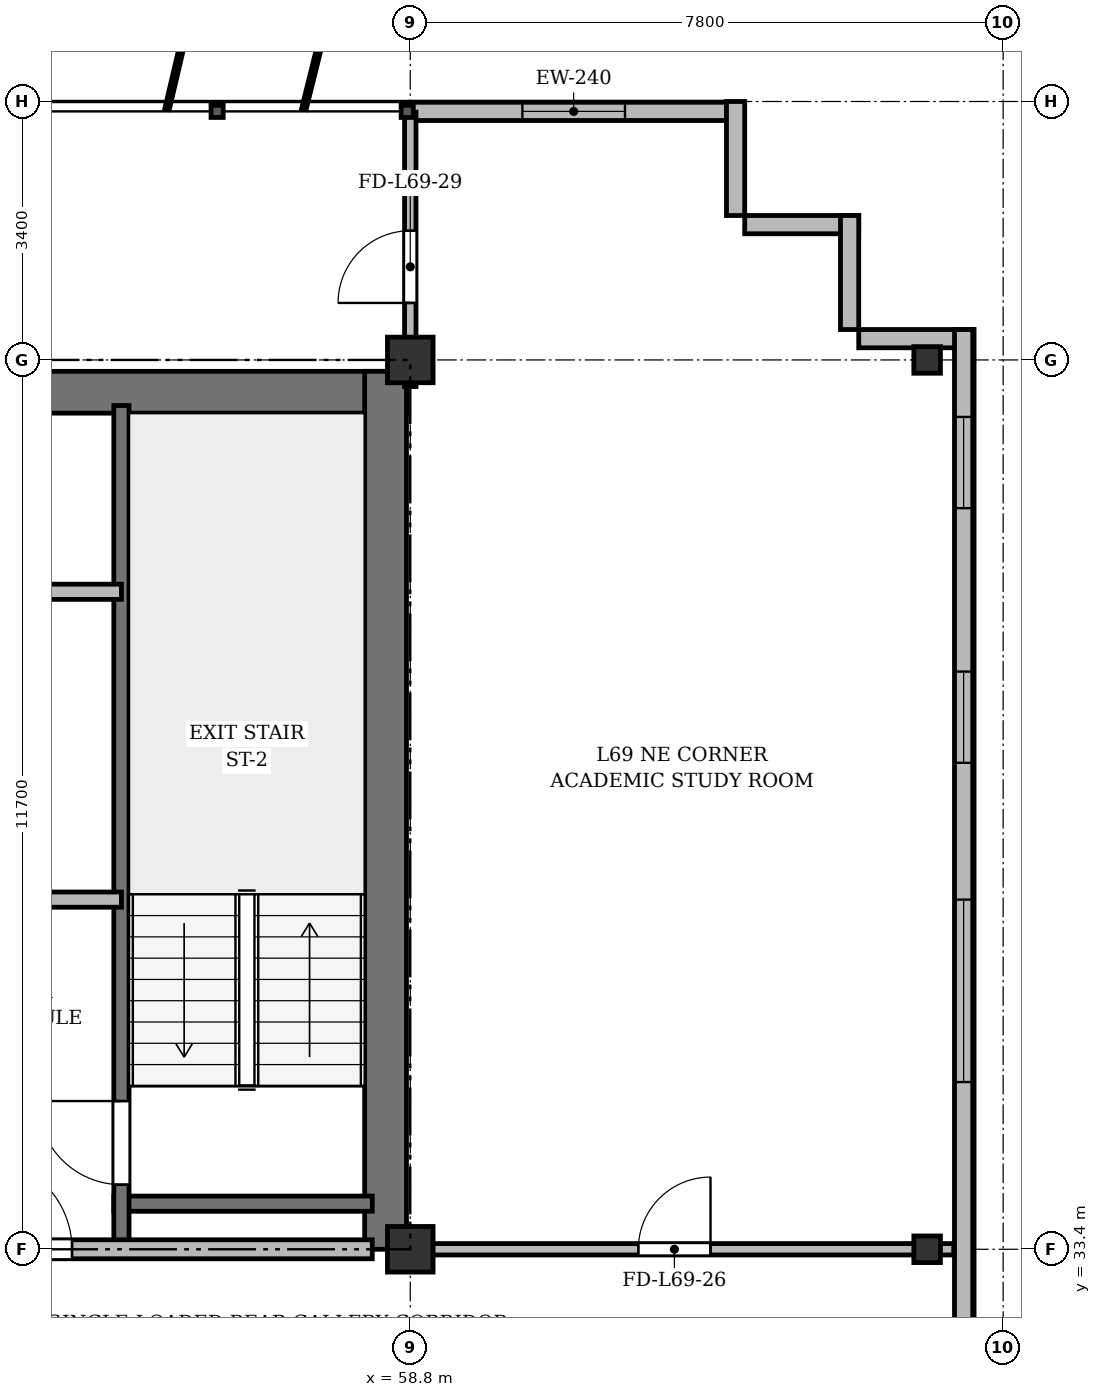
"""IFC4 building model, lengths in metres.
Left out: names, types, materials, properties, quantities, classifications, styles, units other than length and angle.
Written with IfcOpenShell. Run it as: python <this file> out.ifc"""

import sys

from ifc_helpers import new_model, si_unit, direction, frame, frame_2d, origin, origin_2d, place, context, subcontext, project, spatial, rectangle, i_section, extrude, source, transform, mapped, element, fill, save


model = new_model("IFC4")
c1 = context("Model", 3, precision=1e-05, world=origin(), true_north=direction((0.0, 1.0)))
c2 = subcontext(c1, "Body", "Model", "MODEL_VIEW")
j1 = project(units=[si_unit("LENGTHUNIT", "METRE"), si_unit("PLANEANGLEUNIT", "RADIAN")], contexts=[c1])
p1 = place(None, origin())
s1 = spatial("IfcSite", under=j1, at=p1, CompositionType="ELEMENT")
p2 = place(p1, origin())
s2 = spatial("IfcBuilding", under=s1, at=p2, CompositionType="ELEMENT")
p3 = place(p2, frame((0.0, 0.0, 266.7)))
s3 = spatial("IfcBuildingStorey", under=s2, at=p3, CompositionType="ELEMENT", Elevation=266.7)
m1 = source(origin(), c2, "Body", "SweptSolid", [
    extrude(rectangle(XDim=0.6, YDim=0.6, at=origin_2d()), origin(), (0.0, 0.0, 1.0), 3.6),
])
for number, where, z_axis, x_axis in (
    (1, (58.8, 33.4, 0.0), (0.0, 0.0, 1.0), (1.0, 0.0, 0.0)),
    (2, (58.8, 45.1, 0.0), (0.0, 0.0, 1.0), (1.0, 0.0, 0.0)),
):
    element("IfcColumn", number, at=place(p3, frame(where, z_axis=z_axis, x_axis=x_axis)), inside=s3, PredefinedType="COLUMN", context=c2, shape_type="MappedRepresentation", body=[
        mapped(m1, transform((0.0, 0.0, 0.0), x_axis=(1.0, 0.0, 0.0), y_axis=(0.0, 1.0, 0.0), z_axis=(0.0, 0.0, 1.0), scale=1.0)),
    ])
m2 = source(origin(), c2, "Body", "SweptSolid", [
    extrude(i_section(OverallWidth=0.35, OverallDepth=0.35, WebThickness=0.018, FlangeThickness=0.028, at=origin_2d()), origin(), (0.0, 0.0, 1.0), 3.6),
])
for number, where, z_axis, x_axis in (
    (3, (65.6, 33.4, 0.0), (0.0, 0.0, 1.0), (1.0, 0.0, 0.0)),
    (4, (65.6, 45.1, 0.0), (0.0, 0.0, 1.0), (1.0, 0.0, 0.0)),
):
    element("IfcColumn", number, at=place(p3, frame(where, z_axis=z_axis, x_axis=x_axis)), inside=s3, PredefinedType="COLUMN", context=c2, shape_type="MappedRepresentation", body=[
        mapped(m2, transform((0.0, 0.0, 0.0), x_axis=(1.0, 0.0, 0.0), y_axis=(0.0, 1.0, 0.0), z_axis=(0.0, 0.0, 1.0), scale=1.0)),
    ])
p4 = place(p3, frame((58.8, 48.37, 0.0), z_axis=(0.0, 0.0, 1.0), x_axis=(1.0, 0.0, 0.0)))
e5 = element("IfcWall", 5, at=p4, inside=s3, PredefinedType="SOLIDWALL", context=c2, shape_type="SweptSolid", body=[
    extrude(rectangle(XDim=4.3, YDim=0.24, at=frame_2d((2.15, 0.0))), origin(), (0.0, 0.0, 1.0), 3.37),
])
p5 = place(p4, frame((1.475, 0.0, 0.9)))
e6 = element("IfcOpeningElement", 6, at=p5, cuts=e5, PredefinedType="OPENING", context=c2, shape_type="SweptSolid", body=[
    extrude(rectangle(XDim=1.35, YDim=1.5, at=frame_2d((0.675, 0.75))), frame((0.0, 0.13, 0.0), z_axis=(0.0, -1.0, 0.0), x_axis=(1.0, 0.0, 0.0)), (0.0, 0.0, 1.0), 0.26),
])
for number, where, z_axis, x_axis in (
    (7, (63.08, 48.5, 0.0), (0.0, 0.0, 1.0), (0.0, -1.0, 0.0)),
    (8, (63.2, 46.88, 0.0), (0.0, 0.0, 1.0), (1.0, 0.0, 0.0)),
    (9, (64.58, 47.0, 0.0), (0.0, 0.0, 1.0), (0.0, -1.0, 0.0)),
    (10, (64.7, 45.38, 0.0), (0.0, 0.0, 1.0), (1.0, 0.0, 0.0)),
):
    element("IfcWall", number, at=place(p3, frame(where, z_axis=z_axis, x_axis=x_axis)), inside=s3, PredefinedType="SOLIDWALL", context=c2, shape_type="SweptSolid", body=[
        extrude(rectangle(XDim=1.5, YDim=0.24, at=frame_2d((0.75, 0.0))), origin(), (0.0, 0.0, 1.0), 3.37),
    ])
p6 = place(p3, frame((66.08, 45.5, 0.0), z_axis=(0.0, 0.0, 1.0), x_axis=(0.0, -1.0, 0.0)))
e11 = element("IfcWall", 11, at=p6, inside=s3, PredefinedType="SOLIDWALL", context=c2, shape_type="SweptSolid", body=[
    extrude(rectangle(XDim=39.0, YDim=0.24, at=frame_2d((19.5, 0.0))), origin(), (0.0, 0.0, 1.0), 3.37),
])
p7 = place(p6, frame((36.35, 0.0, 0.92)))
e12 = element("IfcOpeningElement", 12, at=p7, cuts=e11, PredefinedType="OPENING", context=c2, shape_type="SweptSolid", body=[
    extrude(rectangle(XDim=1.2, YDim=1.65, at=frame_2d((0.6, 0.825))), frame((0.0, 0.13, 0.0), z_axis=(0.0, -1.0, 0.0), x_axis=(1.0, 0.0, 0.0)), (0.0, 0.0, 1.0), 0.26),
])
p8 = place(p6, frame((32.9, 0.0, 0.92)))
e13 = element("IfcOpeningElement", 13, at=p8, cuts=e11, PredefinedType="OPENING", context=c2, shape_type="SweptSolid", body=[
    extrude(rectangle(XDim=2.4, YDim=2.1, at=frame_2d((1.2, 1.05))), frame((0.0, 0.13, 0.0), z_axis=(0.0, -1.0, 0.0), x_axis=(1.0, 0.0, 0.0)), (0.0, 0.0, 1.0), 0.26),
])
p9 = place(p6, frame((28.7, 0.0, 0.92)))
e14 = element("IfcOpeningElement", 14, at=p9, cuts=e11, PredefinedType="OPENING", context=c2, shape_type="SweptSolid", body=[
    extrude(rectangle(XDim=2.4, YDim=2.1, at=frame_2d((1.2, 1.05))), frame((0.0, 0.13, 0.0), z_axis=(0.0, -1.0, 0.0), x_axis=(1.0, 0.0, 0.0)), (0.0, 0.0, 1.0), 0.26),
])
p10 = place(p6, frame((21.5, 0.0, 0.92)))
e15 = element("IfcOpeningElement", 15, at=p10, cuts=e11, PredefinedType="OPENING", context=c2, shape_type="SweptSolid", body=[
    extrude(rectangle(XDim=2.4, YDim=2.1, at=frame_2d((1.2, 1.05))), frame((0.0, 0.13, 0.0), z_axis=(0.0, -1.0, 0.0), x_axis=(1.0, 0.0, 0.0)), (0.0, 0.0, 1.0), 0.26),
])
p11 = place(p6, frame((7.5, 0.0, 0.92)))
e16 = element("IfcOpeningElement", 16, at=p11, cuts=e11, PredefinedType="OPENING", context=c2, shape_type="SweptSolid", body=[
    extrude(rectangle(XDim=2.4, YDim=2.1, at=frame_2d((1.2, 1.05))), frame((0.0, 0.13, 0.0), z_axis=(0.0, -1.0, 0.0), x_axis=(1.0, 0.0, 0.0)), (0.0, 0.0, 1.0), 0.26),
])
p12 = place(p6, frame((4.5, 0.0, 0.92)))
e17 = element("IfcOpeningElement", 17, at=p12, cuts=e11, PredefinedType="OPENING", context=c2, shape_type="SweptSolid", body=[
    extrude(rectangle(XDim=1.2, YDim=1.65, at=frame_2d((0.6, 0.825))), frame((0.0, 0.13, 0.0), z_axis=(0.0, -1.0, 0.0), x_axis=(1.0, 0.0, 0.0)), (0.0, 0.0, 1.0), 0.26),
])
p13 = place(p6, frame((1.15, 0.0, 0.92)))
e18 = element("IfcOpeningElement", 18, at=p13, cuts=e11, PredefinedType="OPENING", context=c2, shape_type="SweptSolid", body=[
    extrude(rectangle(XDim=1.2, YDim=1.65, at=frame_2d((0.6, 0.825))), frame((0.0, 0.13, 0.0), z_axis=(0.0, -1.0, 0.0), x_axis=(1.0, 0.0, 0.0)), (0.0, 0.0, 1.0), 0.26),
])
p14 = place(p3, frame((15.65, 44.675, 0.0), z_axis=(0.0, 0.0, 1.0), x_axis=(1.0, 0.0, 0.0)))
e19 = element("IfcWall", 19, at=p14, inside=s3, PredefinedType="SHEAR", context=c2, shape_type="SweptSolid", body=[
    extrude(rectangle(XDim=43.1, YDim=0.55, at=frame_2d((21.55, 0.0))), origin(), (0.0, 0.0, 1.0), 3.37),
])
p15 = place(p3, frame((58.475, 33.4, 0.0), z_axis=(0.0, 0.0, 1.0), x_axis=(0.0, 1.0, 0.0)))
e20 = element("IfcWall", 20, at=p15, inside=s3, PredefinedType="SHEAR", context=c2, shape_type="SweptSolid", body=[
    extrude(rectangle(XDim=11.55, YDim=0.55, at=frame_2d((5.775, 0.0))), origin(), (0.0, 0.0, 1.0), 3.37),
])
p16 = place(p3, frame((54.9, 34.0, 0.0), z_axis=(0.0, 0.0, 1.0), x_axis=(1.0, 0.0, 0.0)))
e21 = element("IfcWall", 21, at=p16, inside=s3, PredefinedType="SHEAR", context=c2, shape_type="SweptSolid", body=[
    extrude(rectangle(XDim=3.4, YDim=0.2, at=frame_2d((1.7, 0.0))), origin(), (0.0, 0.0, 1.0), 3.37),
])
p17 = place(p3, frame((55.0, 33.4, 0.0), z_axis=(0.0, 0.0, 1.0), x_axis=(0.0, 1.0, 0.0)))
e22 = element("IfcWall", 22, at=p17, inside=s3, PredefinedType="SHEAR", context=c2, shape_type="SweptSolid", body=[
    extrude(rectangle(XDim=11.1, YDim=0.2, at=frame_2d((5.55, 0.0))), origin(), (0.0, 0.0, 1.0), 3.37),
])
p18 = place(p17, frame((0.85, 0.0, 0.0)))
e23 = element("IfcOpeningElement", 23, at=p18, cuts=e22, PredefinedType="OPENING", context=c2, shape_type="SweptSolid", body=[
    extrude(rectangle(XDim=1.1, YDim=2.15, at=frame_2d((0.55, 1.075))), frame((0.0, 0.11, 0.0), z_axis=(0.0, -1.0, 0.0), x_axis=(1.0, 0.0, 0.0)), (0.0, 0.0, 1.0), 0.22),
])
p19 = place(p3, frame((47.15, 42.05, 0.0), z_axis=(0.0, 0.0, 1.0), x_axis=(1.0, 0.0, 0.0)))
e24 = element("IfcWall", 24, at=p19, inside=s3, PredefinedType="SOLIDWALL", context=c2, shape_type="SweptSolid", body=[
    extrude(rectangle(XDim=7.85, YDim=0.2, at=frame_2d((3.925, 0.0))), origin(), (0.0, 0.0, 1.0), 2.87),
])
p20 = place(p19, frame((0.75, 0.0, 0.0)))
e25 = element("IfcOpeningElement", 25, at=p20, cuts=e24, PredefinedType="OPENING", context=c2, shape_type="SweptSolid", body=[
    extrude(rectangle(XDim=0.9, YDim=2.1, at=frame_2d((0.45, 1.05))), frame((0.0, 0.11, 0.0), z_axis=(0.0, -1.0, 0.0), x_axis=(1.0, 0.0, 0.0)), (0.0, 0.0, 1.0), 0.22),
])
p21 = place(p19, frame((3.85, 0.0, 0.0)))
e26 = element("IfcOpeningElement", 26, at=p21, cuts=e24, PredefinedType="OPENING", context=c2, shape_type="SweptSolid", body=[
    extrude(rectangle(XDim=0.9, YDim=2.1, at=frame_2d((0.45, 1.05))), frame((0.0, 0.11, 0.0), z_axis=(0.0, -1.0, 0.0), x_axis=(1.0, 0.0, 0.0)), (0.0, 0.0, 1.0), 0.22),
])
p22 = place(p3, frame((52.45, 38.0, 0.0), z_axis=(0.0, 0.0, 1.0), x_axis=(1.0, 0.0, 0.0)))
e27 = element("IfcWall", 27, at=p22, inside=s3, PredefinedType="PARTITIONING", context=c2, shape_type="SweptSolid", body=[
    extrude(rectangle(XDim=2.55, YDim=0.2, at=frame_2d((1.275, 0.0))), origin(), (0.0, 0.0, 1.0), 3.37),
])
p23 = place(p3, frame((47.15, 33.4, 0.0), z_axis=(0.0, 0.0, 1.0), x_axis=(1.0, 0.0, 0.0)))
e28 = element("IfcWall", 28, at=p23, inside=s3, PredefinedType="PARTITIONING", context=c2, shape_type="SweptSolid", body=[
    extrude(rectangle(XDim=11.15, YDim=0.25, at=frame_2d((5.575, 0.0))), origin(), (0.0, 0.0, 1.0), 2.92),
])
p24 = place(p23, frame((0.7, 0.0, 0.0)))
e29 = element("IfcOpeningElement", 29, at=p24, cuts=e28, PredefinedType="OPENING", context=c2, shape_type="SweptSolid", body=[
    extrude(rectangle(XDim=0.95, YDim=2.15, at=frame_2d((0.475, 1.075))), frame((0.0, 0.135, 0.0), z_axis=(0.0, -1.0, 0.0), x_axis=(1.0, 0.0, 0.0)), (0.0, 0.0, 1.0), 0.27),
])
p25 = place(p23, frame((6.0, 0.0, 0.0)))
e30 = element("IfcOpeningElement", 30, at=p25, cuts=e28, PredefinedType="OPENING", context=c2, shape_type="SweptSolid", body=[
    extrude(rectangle(XDim=1.2, YDim=2.15, at=frame_2d((0.6, 1.075))), frame((0.0, 0.135, 0.0), z_axis=(0.0, -1.0, 0.0), x_axis=(1.0, 0.0, 0.0)), (0.0, 0.0, 1.0), 0.27),
])
p26 = place(p3, frame((58.8, 33.4, 0.0), z_axis=(0.0, 0.0, 1.0), x_axis=(1.0, 0.0, 0.0)))
e31 = element("IfcWall", 31, at=p26, inside=s3, PredefinedType="PARTITIONING", context=c2, shape_type="SweptSolid", body=[
    extrude(rectangle(XDim=7.15, YDim=0.15, at=frame_2d((3.575, 0.0))), origin(), (0.0, 0.0, 1.0), 2.92),
])
p27 = place(p26, frame((3.0, 0.0, 0.0)))
e32 = element("IfcOpeningElement", 32, at=p27, cuts=e31, PredefinedType="OPENING", context=c2, shape_type="SweptSolid", body=[
    extrude(rectangle(XDim=0.95, YDim=2.15, at=frame_2d((0.475, 1.075))), frame((0.0, 0.085, 0.0), z_axis=(0.0, -1.0, 0.0), x_axis=(1.0, 0.0, 0.0)), (0.0, 0.0, 1.0), 0.17),
])
p28 = place(p3, frame((58.8, 44.75, 0.0), z_axis=(0.0, 0.0, 1.0), x_axis=(0.0, 1.0, 0.0)))
e33 = element("IfcWall", 33, at=p28, inside=s3, PredefinedType="PARTITIONING", context=c2, shape_type="SweptSolid", body=[
    extrude(rectangle(XDim=3.61, YDim=0.15, at=frame_2d((1.805, 0.0))), origin(), (0.0, 0.0, 1.0), 2.87),
])
p29 = place(p28, frame((1.1, 0.0, 0.0)))
e34 = element("IfcOpeningElement", 34, at=p29, cuts=e33, PredefinedType="OPENING", context=c2, shape_type="SweptSolid", body=[
    extrude(rectangle(XDim=0.95, YDim=2.15, at=frame_2d((0.475, 1.075))), frame((0.0, 0.085, 0.0), z_axis=(0.0, -1.0, 0.0), x_axis=(1.0, 0.0, 0.0)), (0.0, 0.0, 1.0), 0.17),
])
m3 = source(origin(), c2, "Body", "SweptSolid", [
    extrude(rectangle(XDim=1.35, YDim=1.5, at=frame_2d((0.675, 0.75))), frame((0.0, 0.03, 0.0), z_axis=(0.0, -1.0, 0.0), x_axis=(1.0, 0.0, 0.0)), (0.0, 0.0, 1.0), 0.06),
])
p30 = place(p5, origin())
e35 = element("IfcWindow", 35, at=p30, inside=s3, PartitioningType="SINGLE_PANEL", PredefinedType="WINDOW", context=c2, shape_type="MappedRepresentation", body=[
    mapped(m3, transform((0.0, 0.0, 0.0), x_axis=(1.0, 0.0, 0.0), y_axis=(0.0, 1.0, 0.0), z_axis=(0.0, 0.0, 1.0), scale=1.0)),
])
fill(e6, e35)
m4 = source(origin(), c2, "Body", "SweptSolid", [
    extrude(rectangle(XDim=2.4, YDim=2.1, at=frame_2d((1.2, 1.05))), frame((0.0, 0.03, 0.0), z_axis=(0.0, -1.0, 0.0), x_axis=(1.0, 0.0, 0.0)), (0.0, 0.0, 1.0), 0.06),
])
p31 = place(p11, origin())
e36 = element("IfcWindow", 36, at=p31, inside=s3, PartitioningType="SINGLE_PANEL", PredefinedType="WINDOW", context=c2, shape_type="MappedRepresentation", body=[
    mapped(m4, transform((0.0, 0.0, 0.0), x_axis=(1.0, 0.0, 0.0), y_axis=(0.0, 1.0, 0.0), z_axis=(0.0, 0.0, 1.0), scale=1.0)),
])
fill(e16, e36)
m5 = source(origin(), c2, "Body", "SweptSolid", [
    extrude(rectangle(XDim=1.2, YDim=1.65, at=frame_2d((0.6, 0.825))), frame((0.0, 0.03, 0.0), z_axis=(0.0, -1.0, 0.0), x_axis=(1.0, 0.0, 0.0)), (0.0, 0.0, 1.0), 0.06),
])
p32 = place(p12, origin())
e37 = element("IfcWindow", 37, at=p32, inside=s3, PartitioningType="SINGLE_PANEL", PredefinedType="WINDOW", context=c2, shape_type="MappedRepresentation", body=[
    mapped(m5, transform((0.0, 0.0, 0.0), x_axis=(1.0, 0.0, 0.0), y_axis=(0.0, 1.0, 0.0), z_axis=(0.0, 0.0, 1.0), scale=1.0)),
])
fill(e17, e37)
p33 = place(p13, origin())
e38 = element("IfcWindow", 38, at=p33, inside=s3, PartitioningType="SINGLE_PANEL", PredefinedType="WINDOW", context=c2, shape_type="MappedRepresentation", body=[
    mapped(m5, transform((0.0, 0.0, 0.0), x_axis=(1.0, 0.0, 0.0), y_axis=(0.0, 1.0, 0.0), z_axis=(0.0, 0.0, 1.0), scale=1.0)),
])
fill(e18, e38)
m6 = source(origin(), c2, "Body", "SweptSolid", [
    extrude(rectangle(XDim=1.1, YDim=2.15, at=frame_2d((0.55, 1.075))), frame((0.0, 0.025, 0.0), z_axis=(0.0, -1.0, 0.0), x_axis=(1.0, 0.0, 0.0)), (0.0, 0.0, 1.0), 0.05),
])
p34 = place(p18, origin())
e39 = element("IfcDoor", 39, at=p34, inside=s3, OperationType="SINGLE_SWING_RIGHT", PredefinedType="DOOR", context=c2, shape_type="MappedRepresentation", body=[
    mapped(m6, transform((0.0, 0.0, 0.0), x_axis=(1.0, 0.0, 0.0), y_axis=(0.0, 1.0, 0.0), z_axis=(0.0, 0.0, 1.0), scale=1.0)),
])
fill(e23, e39)
m7 = source(origin(), c2, "Body", "SweptSolid", [
    extrude(rectangle(XDim=1.2, YDim=2.15, at=frame_2d((0.6, 1.075))), frame((0.0, 0.025, 0.0), z_axis=(0.0, -1.0, 0.0), x_axis=(1.0, 0.0, 0.0)), (0.0, 0.0, 1.0), 0.05),
])
p35 = place(p25, origin())
e40 = element("IfcDoor", 40, at=p35, inside=s3, OperationType="SINGLE_SWING_LEFT", PredefinedType="DOOR", context=c2, shape_type="MappedRepresentation", body=[
    mapped(m7, transform((0.0, 0.0, 0.0), x_axis=(1.0, 0.0, 0.0), y_axis=(0.0, 1.0, 0.0), z_axis=(0.0, 0.0, 1.0), scale=1.0)),
])
fill(e30, e40)
m8 = source(origin(), c2, "Body", "SweptSolid", [
    extrude(rectangle(XDim=0.95, YDim=2.15, at=frame_2d((0.475, 1.075))), frame((0.0, 0.025, 0.0), z_axis=(0.0, -1.0, 0.0), x_axis=(1.0, 0.0, 0.0)), (0.0, 0.0, 1.0), 0.05),
])
p36 = place(p27, origin())
e41 = element("IfcDoor", 41, at=p36, inside=s3, OperationType="SINGLE_SWING_RIGHT", PredefinedType="DOOR", context=c2, shape_type="MappedRepresentation", body=[
    mapped(m8, transform((0.0, 0.0, 0.0), x_axis=(1.0, 0.0, 0.0), y_axis=(0.0, 1.0, 0.0), z_axis=(0.0, 0.0, 1.0), scale=1.0)),
])
fill(e32, e41)
p37 = place(p29, origin())
e42 = element("IfcDoor", 42, at=p37, inside=s3, OperationType="SINGLE_SWING_LEFT", PredefinedType="DOOR", context=c2, shape_type="MappedRepresentation", body=[
    mapped(m8, transform((0.0, 0.0, 0.0), x_axis=(1.0, 0.0, 0.0), y_axis=(0.0, 1.0, 0.0), z_axis=(0.0, 0.0, 1.0), scale=1.0)),
])
fill(e34, e42)
save(model, sys.argv[1])
